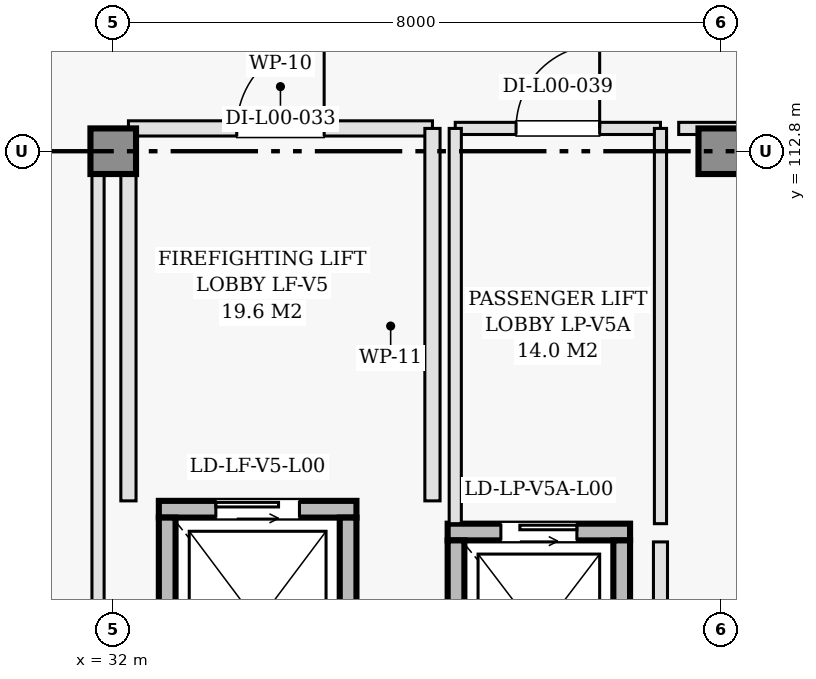
"""IFC4 building model, lengths in metres.
Left out: names, types, materials, properties, quantities, classifications, styles, units other than length and angle.
Written with IfcOpenShell. Run it as: python <this file> out.ifc"""

import sys

from ifc_helpers import new_model, si_unit, direction, frame, frame_2d, origin, origin_2d, place, context, subcontext, project, spatial, rectangle, extrude, element, fill, save


model = new_model("IFC4")
c1 = context("Model", 3, precision=1e-05, world=origin(), true_north=direction((0.0, 1.0)))
c2 = subcontext(c1, "Body", "Model", "MODEL_VIEW")
j1 = project(units=[si_unit("LENGTHUNIT", "METRE"), si_unit("PLANEANGLEUNIT", "RADIAN")], contexts=[c1])
p1 = place(None, origin())
s1 = spatial("IfcSite", under=j1, at=p1, CompositionType="ELEMENT")
p2 = place(p1, origin())
s2 = spatial("IfcBuilding", under=s1, at=p2, CompositionType="ELEMENT")
p3 = place(p2, origin())
s3 = spatial("IfcBuildingStorey", under=s2, at=p3, CompositionType="ELEMENT", Elevation=0.0)
for number, where, z_axis, x_axis in (
    (1, (32.0, 112.8, 0.0), (0.0, 0.0, 1.0), (1.0, 0.0, 0.0)),
    (2, (40.0, 112.8, 0.0), (0.0, 0.0, 1.0), (1.0, 0.0, 0.0)),
):
    element("IfcColumn", number, at=place(p3, frame(where, z_axis=z_axis, x_axis=x_axis)), inside=s3, PredefinedType="COLUMN", context=c2, shape_type="SweptSolid", body=[
        extrude(rectangle(XDim=0.6, YDim=0.6, at=origin_2d()), origin(), (0.0, 0.0, 1.0), 4.8),
    ])
p4 = place(p3, frame((32.6, 108.09, 0.0), z_axis=(0.0, 0.0, 1.0), x_axis=(1.0, 0.0, 0.0)))
e3 = element("IfcWall", 3, at=p4, inside=s3, PredefinedType="SHEAR", context=c2, shape_type="SweptSolid", body=[
    extrude(rectangle(XDim=2.6, YDim=0.22, at=frame_2d((1.3, 0.0))), origin(), (0.0, 0.0, 1.0), 4.52),
])
p5 = place(p4, frame((0.75, 0.0, 0.0)))
e4 = element("IfcOpeningElement", 4, at=p5, cuts=e3, PredefinedType="OPENING", context=c2, shape_type="SweptSolid", body=[
    extrude(rectangle(XDim=1.1, YDim=2.15, at=frame_2d((0.55, 1.075))), frame((0.0, 0.12, 0.0), z_axis=(0.0, -1.0, 0.0), x_axis=(1.0, 0.0, 0.0)), (0.0, 0.0, 1.0), 0.24),
])
for number, where, z_axis, x_axis in (
    (5, (32.71, 105.22, 0.0), (0.0, 0.0, 1.0), (0.0, 1.0, 0.0)),
    (6, (35.09, 105.22, 0.0), (0.0, 0.0, 1.0), (0.0, 1.0, 0.0)),
):
    element("IfcWall", number, at=place(p3, frame(where, z_axis=z_axis, x_axis=x_axis)), inside=s3, PredefinedType="SHEAR", context=c2, shape_type="SweptSolid", body=[
        extrude(rectangle(XDim=2.76, YDim=0.22, at=frame_2d((1.38, 0.0))), origin(), (0.0, 0.0, 1.0), 4.52),
    ])
p6 = place(p3, frame((32.2, 113.1, 0.0), z_axis=(0.0, 0.0, 1.0), x_axis=(1.0, 0.0, 0.0)))
e7 = element("IfcWall", 7, at=p6, inside=s3, PredefinedType="PARTITIONING", context=c2, shape_type="SweptSolid", body=[
    extrude(rectangle(XDim=4.0, YDim=0.2, at=frame_2d((2.0, 0.0))), origin(), (0.0, 0.0, 1.0), 3.755),
])
p7 = place(p6, frame((1.425, 0.0, 0.0)))
e8 = element("IfcOpeningElement", 8, at=p7, cuts=e7, PredefinedType="OPENING", context=c2, shape_type="SweptSolid", body=[
    extrude(rectangle(XDim=1.15, YDim=2.15, at=frame_2d((0.575, 1.075))), frame((0.0, 0.11, 0.0), z_axis=(0.0, -1.0, 0.0), x_axis=(1.0, 0.0, 0.0)), (0.0, 0.0, 1.0), 0.22),
])
for number, where, z_axis, x_axis in (
    (9, (32.2, 108.2, 0.0), (0.0, 0.0, 1.0), (0.0, 1.0, 0.0)),
    (10, (36.2, 108.2, 0.0), (0.0, 0.0, 1.0), (0.0, 1.0, 0.0)),
):
    element("IfcWall", number, at=place(p3, frame(where, z_axis=z_axis, x_axis=x_axis)), inside=s3, PredefinedType="PARTITIONING", context=c2, shape_type="SweptSolid", body=[
        extrude(rectangle(XDim=4.9, YDim=0.2, at=frame_2d((2.45, 0.0))), origin(), (0.0, 0.0, 1.0), 3.755),
    ])
p8 = place(p3, frame((36.4, 107.79, 0.0), z_axis=(0.0, 0.0, 1.0), x_axis=(1.0, 0.0, 0.0)))
e11 = element("IfcWall", 11, at=p8, inside=s3, PredefinedType="SHEAR", context=c2, shape_type="SweptSolid", body=[
    extrude(rectangle(XDim=2.4, YDim=0.22, at=frame_2d((1.2, 0.0))), origin(), (0.0, 0.0, 1.0), 4.52),
])
p9 = place(p8, frame((0.7, 0.0, 0.0)))
e12 = element("IfcOpeningElement", 12, at=p9, cuts=e11, PredefinedType="OPENING", context=c2, shape_type="SweptSolid", body=[
    extrude(rectangle(XDim=1.0, YDim=2.15, at=frame_2d((0.5, 1.075))), frame((0.0, 0.12, 0.0), z_axis=(0.0, -1.0, 0.0), x_axis=(1.0, 0.0, 0.0)), (0.0, 0.0, 1.0), 0.24),
])
for number, where, z_axis, x_axis in (
    (13, (36.51, 105.22, 0.0), (0.0, 0.0, 1.0), (0.0, 1.0, 0.0)),
    (14, (38.69, 105.22, 0.0), (0.0, 0.0, 1.0), (0.0, 1.0, 0.0)),
):
    element("IfcWall", number, at=place(p3, frame(where, z_axis=z_axis, x_axis=x_axis)), inside=s3, PredefinedType="SHEAR", context=c2, shape_type="SweptSolid", body=[
        extrude(rectangle(XDim=2.46, YDim=0.22, at=frame_2d((1.23, 0.0))), origin(), (0.0, 0.0, 1.0), 4.52),
    ])
p10 = place(p3, frame((36.5, 113.1, 0.0), z_axis=(0.0, 0.0, 1.0), x_axis=(1.0, 0.0, 0.0)))
e15 = element("IfcWall", 15, at=p10, inside=s3, PredefinedType="PARTITIONING", context=c2, shape_type="SweptSolid", body=[
    extrude(rectangle(XDim=2.7, YDim=0.16, at=frame_2d((1.35, 0.0))), origin(), (0.0, 0.0, 1.0), 3.755),
])
p11 = place(p10, frame((0.8, 0.0, 0.0)))
e16 = element("IfcOpeningElement", 16, at=p11, cuts=e15, PredefinedType="OPENING", context=c2, shape_type="SweptSolid", body=[
    extrude(rectangle(XDim=1.1, YDim=2.15, at=frame_2d((0.55, 1.075))), frame((0.0, 0.09, 0.0), z_axis=(0.0, -1.0, 0.0), x_axis=(1.0, 0.0, 0.0)), (0.0, 0.0, 1.0), 0.18),
])
for number, where, z_axis, x_axis in (
    (17, (36.5, 107.9, 0.0), (0.0, 0.0, 1.0), (0.0, 1.0, 0.0)),
    (18, (39.2, 107.9, 0.0), (0.0, 0.0, 1.0), (0.0, 1.0, 0.0)),
):
    element("IfcWall", number, at=place(p3, frame(where, z_axis=z_axis, x_axis=x_axis)), inside=s3, PredefinedType="PARTITIONING", context=c2, shape_type="SweptSolid", body=[
        extrude(rectangle(XDim=5.2, YDim=0.16, at=frame_2d((2.6, 0.0))), origin(), (0.0, 0.0, 1.0), 3.755),
    ])
p12 = place(p3, frame((39.44, 113.1, 0.0), z_axis=(0.0, 0.0, 1.0), x_axis=(1.0, 0.0, 0.0)))
e19 = element("IfcWall", 19, at=p12, inside=s3, PredefinedType="PARTITIONING", context=c2, shape_type="SweptSolid", body=[
    extrude(rectangle(XDim=26.969, YDim=0.16, at=frame_2d((13.484, 0.0))), origin(), (0.0, 0.0, 1.0), 3.605),
])
p13 = place(p3, frame((39.2, 95.105, 0.0), z_axis=(0.0, 0.0, 1.0), x_axis=(0.0, 1.0, 0.0)))
e20 = element("IfcWall", 20, at=p13, inside=s3, PredefinedType="PARTITIONING", context=c2, shape_type="SweptSolid", body=[
    extrude(rectangle(XDim=12.555, YDim=0.185, at=frame_2d((6.277, 0.0))), origin(), (0.0, 0.0, 1.0), 3.755),
])
p14 = place(p3, frame((31.8, 104.7, 0.0), z_axis=(0.0, 0.0, 1.0), x_axis=(0.0, 1.0, 0.0)))
e21 = element("IfcWall", 21, at=p14, inside=s3, PredefinedType="PARTITIONING", context=c2, shape_type="SweptSolid", body=[
    extrude(rectangle(XDim=8.4, YDim=0.16, at=frame_2d((4.2, 0.0))), origin(), (0.0, 0.0, 1.0), 3.855),
])
p15 = place(p5, origin())
e22 = element("IfcDoor", 22, at=p15, inside=s3, OperationType="SLIDING_TO_LEFT", PredefinedType="DOOR", context=c2, shape_type="SweptSolid", body=[
    extrude(rectangle(XDim=1.1, YDim=2.15, at=frame_2d((0.55, 1.075))), frame((0.0, 0.025, 0.0), z_axis=(0.0, -1.0, 0.0), x_axis=(1.0, 0.0, 0.0)), (0.0, 0.0, 1.0), 0.05),
])
fill(e4, e22)
p16 = place(p7, origin())
e23 = element("IfcDoor", 23, at=p16, inside=s3, OperationType="SINGLE_SWING_RIGHT", PredefinedType="DOOR", context=c2, shape_type="SweptSolid", body=[
    extrude(rectangle(XDim=1.15, YDim=2.15, at=frame_2d((0.575, 1.075))), frame((0.0, 0.025, 0.0), z_axis=(0.0, -1.0, 0.0), x_axis=(1.0, 0.0, 0.0)), (0.0, 0.0, 1.0), 0.05),
])
fill(e8, e23)
p17 = place(p9, origin())
e24 = element("IfcDoor", 24, at=p17, inside=s3, OperationType="SLIDING_TO_RIGHT", PredefinedType="DOOR", context=c2, shape_type="SweptSolid", body=[
    extrude(rectangle(XDim=1.0, YDim=2.15, at=frame_2d((0.5, 1.075))), frame((0.0, 0.025, 0.0), z_axis=(0.0, -1.0, 0.0), x_axis=(1.0, 0.0, 0.0)), (0.0, 0.0, 1.0), 0.05),
])
fill(e12, e24)
p18 = place(p11, origin())
e25 = element("IfcDoor", 25, at=p18, inside=s3, OperationType="SINGLE_SWING_RIGHT", PredefinedType="DOOR", context=c2, shape_type="SweptSolid", body=[
    extrude(rectangle(XDim=1.1, YDim=2.15, at=frame_2d((0.55, 1.075))), frame((0.0, 0.025, 0.0), z_axis=(0.0, -1.0, 0.0), x_axis=(1.0, 0.0, 0.0)), (0.0, 0.0, 1.0), 0.05),
])
fill(e16, e25)
save(model, sys.argv[1])
